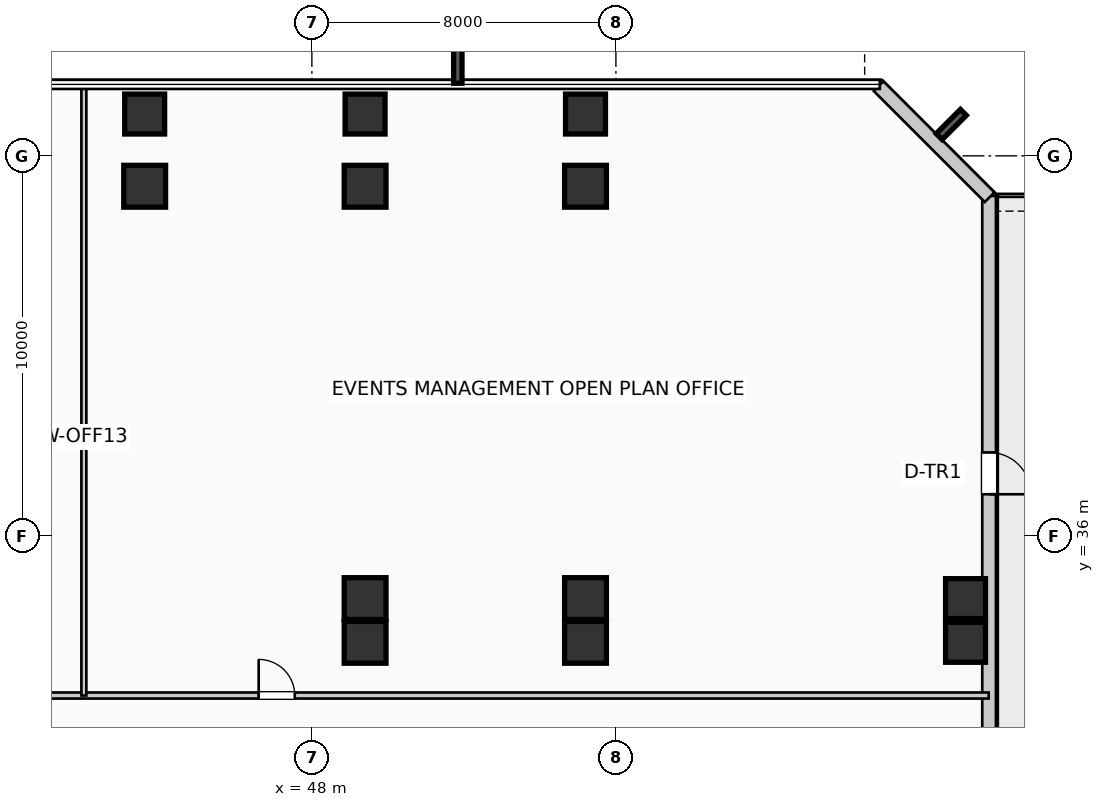
"""IFC4 building model, lengths in metres.
Left out: names, types, materials, properties, quantities, classifications, styles, units other than length and angle.
Written with IfcOpenShell. Run it as: python <this file> out.ifc"""

import sys

from ifc_helpers import new_model, si_unit, direction, frame, frame_2d, origin, origin_2d, place, context, subcontext, project, spatial, rectangle, extrude, element, fill, save


model = new_model("IFC4")
c1 = context("Model", 3, precision=1e-05, world=origin(), true_north=direction((0.0, 1.0)))
c2 = subcontext(c1, "Body", "Model", "MODEL_VIEW")
j1 = project(units=[si_unit("LENGTHUNIT", "METRE"), si_unit("PLANEANGLEUNIT", "RADIAN")], contexts=[c1])
p1 = place(None, origin())
s1 = spatial("IfcSite", under=j1, at=p1, CompositionType="ELEMENT")
p2 = place(p1, origin())
s2 = spatial("IfcBuilding", under=s1, at=p2, CompositionType="ELEMENT")
p3 = place(p2, frame((0.0, 0.0, 11.22)))
s3 = spatial("IfcBuildingStorey", under=s2, at=p3, CompositionType="ELEMENT", Elevation=11.22)
p4 = place(p3, frame((43.6, 45.2, 0.0), z_axis=(0.0, 0.0, 1.0), x_axis=(1.0, 0.0, 0.0)))
e1 = element("IfcColumn", 1, at=p4, inside=s3, PredefinedType="COLUMN", context=c2, shape_type="SweptSolid", body=[
    extrude(rectangle(XDim=1.1, YDim=1.1, at=origin_2d()), origin(), (0.0, 0.0, 1.0), 5.28),
])
p5 = place(p3, frame((43.6, 47.1, 0.0), z_axis=(0.0, 0.0, 1.0), x_axis=(1.0, 0.0, 0.0)))
e2 = element("IfcColumn", 2, at=p5, inside=s3, PredefinedType="COLUMN", context=c2, shape_type="SweptSolid", body=[
    extrude(rectangle(XDim=1.05, YDim=1.05, at=origin_2d()), origin(), (0.0, 0.0, 1.0), 5.28),
])
for number, where, z_axis, x_axis in (
    (3, (49.4, 33.2, 0.0), (0.0, 0.0, 1.0), (1.0, 0.0, 0.0)),
    (4, (49.4, 34.35, 0.0), (0.0, 0.0, 1.0), (1.0, 0.0, 0.0)),
    (5, (49.4, 45.2, 0.0), (0.0, 0.0, 1.0), (1.0, 0.0, 0.0)),
):
    element("IfcColumn", number, at=place(p3, frame(where, z_axis=z_axis, x_axis=x_axis)), inside=s3, PredefinedType="COLUMN", context=c2, shape_type="SweptSolid", body=[
        extrude(rectangle(XDim=1.1, YDim=1.1, at=origin_2d()), origin(), (0.0, 0.0, 1.0), 5.28),
    ])
p6 = place(p3, frame((49.4, 47.1, 0.0), z_axis=(0.0, 0.0, 1.0), x_axis=(1.0, 0.0, 0.0)))
e6 = element("IfcColumn", 6, at=p6, inside=s3, PredefinedType="COLUMN", context=c2, shape_type="SweptSolid", body=[
    extrude(rectangle(XDim=1.05, YDim=1.05, at=origin_2d()), origin(), (0.0, 0.0, 1.0), 5.28),
])
for number, where, z_axis, x_axis in (
    (7, (55.2, 33.2, 0.0), (0.0, 0.0, 1.0), (1.0, 0.0, 0.0)),
    (8, (55.2, 34.35, 0.0), (0.0, 0.0, 1.0), (1.0, 0.0, 0.0)),
    (9, (55.2, 45.2, 0.0), (0.0, 0.0, 1.0), (1.0, 0.0, 0.0)),
):
    element("IfcColumn", number, at=place(p3, frame(where, z_axis=z_axis, x_axis=x_axis)), inside=s3, PredefinedType="COLUMN", context=c2, shape_type="SweptSolid", body=[
        extrude(rectangle(XDim=1.1, YDim=1.1, at=origin_2d()), origin(), (0.0, 0.0, 1.0), 5.28),
    ])
for number, where, z_axis, x_axis in (
    (10, (55.2, 47.1, 0.0), (0.0, 0.0, 1.0), (1.0, 0.0, 0.0)),
    (11, (65.2, 33.2, 0.0), (0.0, 0.0, 1.0), (1.0, 0.0, 0.0)),
    (12, (65.2, 34.35, 0.0), (0.0, 0.0, 1.0), (1.0, 0.0, 0.0)),
):
    element("IfcColumn", number, at=place(p3, frame(where, z_axis=z_axis, x_axis=x_axis)), inside=s3, PredefinedType="COLUMN", context=c2, shape_type="SweptSolid", body=[
        extrude(rectangle(XDim=1.05, YDim=1.05, at=origin_2d()), origin(), (0.0, 0.0, 1.0), 5.28),
    ])
p7 = place(p3, frame((65.82, 19.055, 0.0), z_axis=(0.0, 0.0, 1.0), x_axis=(0.0, 1.0, 0.0)))
e13 = element("IfcWall", 13, at=p7, inside=s3, PredefinedType="SOLIDWALL", context=c2, shape_type="SweptSolid", body=[
    extrude(rectangle(XDim=25.89, YDim=0.36, at=frame_2d((12.945, 0.0))), origin(), (0.0, 0.0, 1.0), 4.96),
])
p8 = place(p7, frame((19.141, 0.0, 0.0), z_axis=(0.0, 0.0, 1.0), x_axis=(-1.0, 0.0, 0.0)))
e14 = element("IfcOpeningElement", 14, at=p8, cuts=e13, PredefinedType="OPENING", context=c2, shape_type="SweptSolid", body=[
    extrude(rectangle(XDim=1.1, YDim=2.2, at=frame_2d((0.55, 1.1))), frame((0.0, 0.19, 0.0), z_axis=(0.0, -1.0, 0.0), x_axis=(1.0, 0.0, 0.0)), (0.0, 0.0, 1.0), 0.38),
])
p9 = place(p3, frame((65.834, 44.912, 0.0), z_axis=(0.0, 0.0, 1.0), x_axis=(-0.707106781187, 0.707106781187, 0.0)))
e15 = element("IfcWall", 15, at=p9, inside=s3, PredefinedType="SOLIDWALL", context=c2, shape_type="SweptSolid", body=[
    extrude(rectangle(XDim=4.133, YDim=0.36, at=frame_2d((2.066, 0.0))), origin(), (0.0, 0.0, 1.0), 4.96),
])
p10 = place(p3, frame((23.6, 31.8, 0.0), z_axis=(0.0, 0.0, 1.0), x_axis=(1.0, 0.0, 0.0)))
e16 = element("IfcWall", 16, at=p10, inside=s3, PredefinedType="PARTITIONING", context=c2, shape_type="SweptSolid", body=[
    extrude(rectangle(XDim=42.21, YDim=0.16, at=frame_2d((21.105, 0.0))), origin(), (0.0, 0.0, 1.0), 4.96),
])
p11 = place(p10, frame((5.0, 0.0, 0.0)))
e17 = element("IfcOpeningElement", 17, at=p11, cuts=e16, PredefinedType="OPENING", context=c2, shape_type="SweptSolid", body=[
    extrude(rectangle(XDim=0.95, YDim=2.15, at=frame_2d((0.475, 1.075))), frame((0.0, 0.09, 0.0), z_axis=(0.0, -1.0, 0.0), x_axis=(1.0, 0.0, 0.0)), (0.0, 0.0, 1.0), 0.18),
])
p12 = place(p10, frame((23.0, 0.0, 0.0)))
e18 = element("IfcOpeningElement", 18, at=p12, cuts=e16, PredefinedType="OPENING", context=c2, shape_type="SweptSolid", body=[
    extrude(rectangle(XDim=0.95, YDim=2.15, at=frame_2d((0.475, 1.075))), frame((0.0, 0.09, 0.0), z_axis=(0.0, -1.0, 0.0), x_axis=(1.0, 0.0, 0.0)), (0.0, 0.0, 1.0), 0.18),
])
p13 = place(p3, frame((42.0, 31.8, 0.0), z_axis=(0.0, 0.0, 1.0), x_axis=(0.0, 1.0, 0.0)))
e19 = element("IfcWall", 19, at=p13, inside=s3, PredefinedType="PARTITIONING", context=c2, shape_type="SweptSolid", body=[
    extrude(rectangle(XDim=16.01, YDim=0.13, at=frame_2d((8.005, 0.0))), origin(), (0.0, 0.0, 1.0), 4.96),
])
p14 = place(p8, origin())
e20 = element("IfcDoor", 20, at=p14, inside=s3, OperationType="SINGLE_SWING_LEFT", PredefinedType="DOOR", context=c2, shape_type="SweptSolid", body=[
    extrude(rectangle(XDim=1.1, YDim=2.2, at=frame_2d((0.55, 1.1))), frame((0.0, 0.025, 0.0), z_axis=(0.0, -1.0, 0.0), x_axis=(1.0, 0.0, 0.0)), (0.0, 0.0, 1.0), 0.05),
])
fill(e14, e20)
p15 = place(p12, origin())
e21 = element("IfcDoor", 21, at=p15, inside=s3, OperationType="SINGLE_SWING_LEFT", PredefinedType="DOOR", context=c2, shape_type="SweptSolid", body=[
    extrude(rectangle(XDim=0.95, YDim=2.15, at=frame_2d((0.475, 1.075))), frame((0.0, 0.025, 0.0), z_axis=(0.0, -1.0, 0.0), x_axis=(1.0, 0.0, 0.0)), (0.0, 0.0, 1.0), 0.05),
])
fill(e18, e21)
save(model, sys.argv[1])
